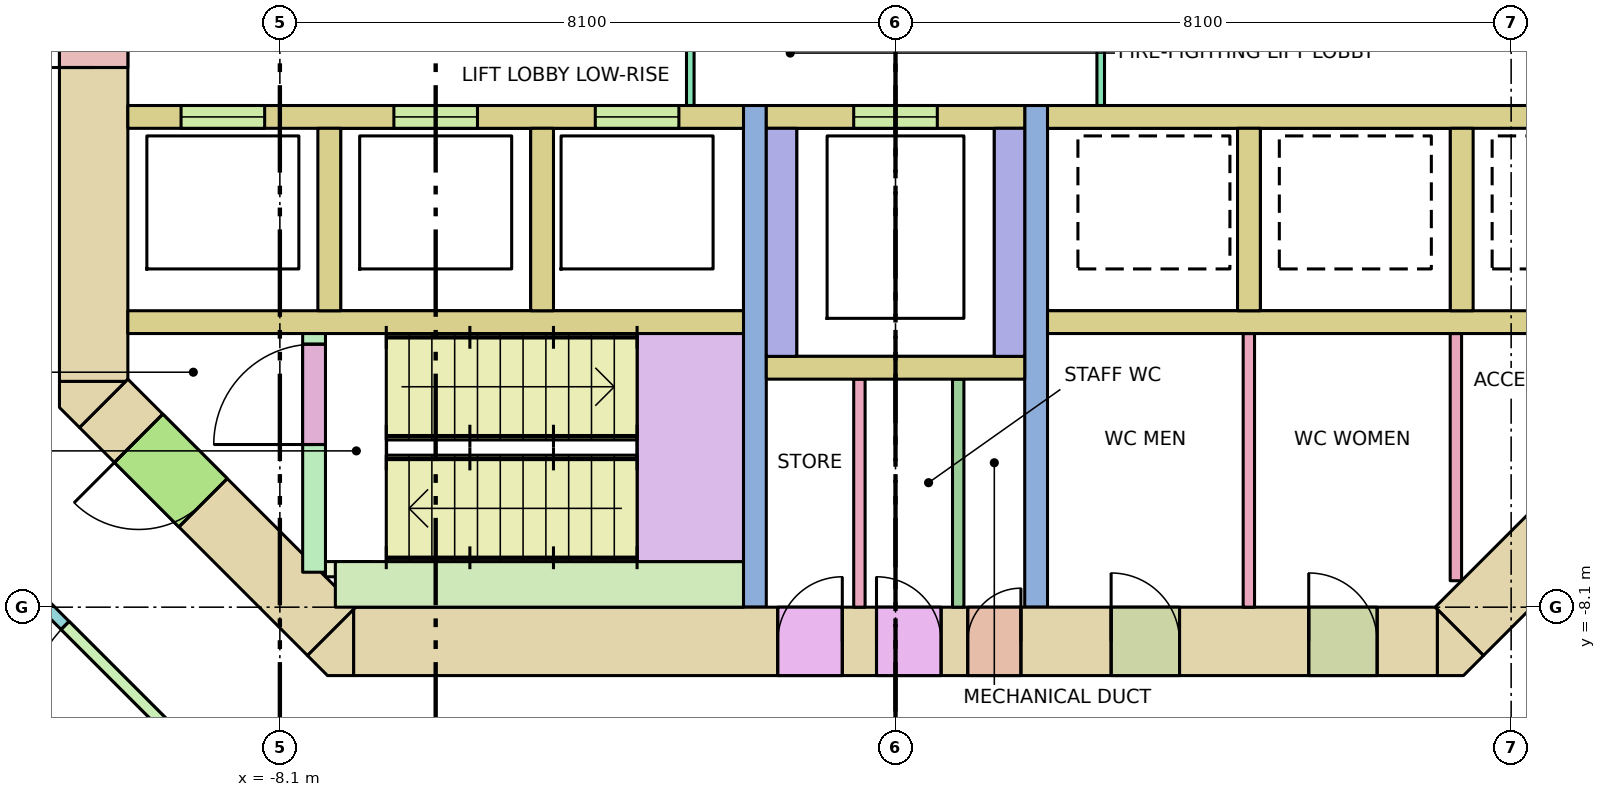
"""IFC4 building model, lengths in metres.
Left out: names, types, materials, properties, quantities, classifications, styles, units other than length and angle.
Written with IfcOpenShell. Run it as: python <this file> out.ifc"""

import sys

from ifc_helpers import new_model, si_unit, direction, frame, frame_2d, origin, place, context, subcontext, project, spatial, polyline, rectangle, outline, extrude, element, fill, save


model = new_model("IFC4")
c1 = context("Model", 3, precision=1e-05, world=origin(), true_north=direction((0.0, 1.0)))
c2 = subcontext(c1, "Body", "Model", "MODEL_VIEW")
j1 = project(units=[si_unit("LENGTHUNIT", "METRE"), si_unit("PLANEANGLEUNIT", "RADIAN")], contexts=[c1])
p1 = place(None, origin())
s1 = spatial("IfcSite", under=j1, at=p1, CompositionType="ELEMENT")
p2 = place(p1, origin())
s2 = spatial("IfcBuilding", under=s1, at=p2, CompositionType="ELEMENT")
p3 = place(p2, frame((0.0, 0.0, 71.0)))
s3 = spatial("IfcBuildingStorey", under=s2, at=p3, CompositionType="ELEMENT", Elevation=71.0)
p4 = place(p3, frame((-7.13, -8.55, -0.28), z_axis=(0.0, 0.0, 1.0), x_axis=(1.0, 0.0, 0.0)))
e1 = element("IfcWall", 1, at=p4, inside=s3, PredefinedType="SHEAR", context=c2, shape_type="SweptSolid", body=[
    extrude(rectangle(XDim=14.26, YDim=0.9, at=frame_2d((7.13, 0.0))), origin(), (0.0, 0.0, 1.0), 4.0),
])
p5 = place(p4, frame((8.08, 0.0, 0.28)))
e2 = element("IfcOpeningElement", 2, at=p5, cuts=e1, PredefinedType="OPENING", context=c2, shape_type="SweptSolid", body=[
    extrude(rectangle(XDim=0.7, YDim=2.1, at=frame_2d((0.35, 1.05))), frame((0.0, 0.46, 0.0), z_axis=(0.0, -1.0, 0.0), x_axis=(1.0, 0.0, 0.0)), (0.0, 0.0, 1.0), 0.92),
])
p6 = place(p4, frame((5.58, 0.0, 0.28)))
e3 = element("IfcOpeningElement", 3, at=p6, cuts=e1, PredefinedType="OPENING", context=c2, shape_type="SweptSolid", body=[
    extrude(rectangle(XDim=0.85, YDim=2.1, at=frame_2d((0.425, 1.05))), frame((0.0, 0.46, 0.0), z_axis=(0.0, -1.0, 0.0), x_axis=(1.0, 0.0, 0.0)), (0.0, 0.0, 1.0), 0.92),
])
p7 = place(p4, frame((6.88, 0.0, 0.28)))
e4 = element("IfcOpeningElement", 4, at=p7, cuts=e1, PredefinedType="OPENING", context=c2, shape_type="SweptSolid", body=[
    extrude(rectangle(XDim=0.85, YDim=2.1, at=frame_2d((0.425, 1.05))), frame((0.0, 0.46, 0.0), z_axis=(0.0, -1.0, 0.0), x_axis=(1.0, 0.0, 0.0)), (0.0, 0.0, 1.0), 0.92),
])
p8 = place(p4, frame((9.967, 0.0, 0.28)))
e5 = element("IfcOpeningElement", 5, at=p8, cuts=e1, PredefinedType="OPENING", context=c2, shape_type="SweptSolid", body=[
    extrude(rectangle(XDim=0.9, YDim=2.1, at=frame_2d((0.45, 1.05))), frame((0.0, 0.46, 0.0), z_axis=(0.0, -1.0, 0.0), x_axis=(1.0, 0.0, 0.0)), (0.0, 0.0, 1.0), 0.92),
])
p9 = place(p4, frame((12.567, 0.0, 0.28)))
e6 = element("IfcOpeningElement", 6, at=p9, cuts=e1, PredefinedType="OPENING", context=c2, shape_type="SweptSolid", body=[
    extrude(rectangle(XDim=0.9, YDim=2.1, at=frame_2d((0.45, 1.05))), frame((0.0, 0.46, 0.0), z_axis=(0.0, -1.0, 0.0), x_axis=(1.0, 0.0, 0.0)), (0.0, 0.0, 1.0), 0.92),
])
p10 = place(p3, frame((-10.55, -5.13, -0.28), z_axis=(0.0, 0.0, 1.0), x_axis=(0.0, 1.0, 0.0)))
e7 = element("IfcWall", 7, at=p10, inside=s3, PredefinedType="SHEAR", context=c2, shape_type="SweptSolid", body=[
    extrude(rectangle(XDim=10.26, YDim=0.9, at=frame_2d((5.13, 0.0))), origin(), (0.0, 0.0, 1.0), 4.0),
])
p11 = place(p10, frame((4.13, 0.0, 0.28)))
e8 = element("IfcOpeningElement", 8, at=p11, cuts=e7, PredefinedType="OPENING", context=c2, shape_type="SweptSolid", body=[
    extrude(rectangle(XDim=2.0, YDim=2.1, at=frame_2d((1.0, 1.05))), frame((0.0, 0.46, 0.0), z_axis=(0.0, -1.0, 0.0), x_axis=(1.0, 0.0, 0.0)), (0.0, 0.0, 1.0), 0.92),
])
p12 = place(p3, frame((10.418, -5.418, -0.28), z_axis=(0.0, 0.0, 1.0), x_axis=(-0.707106781187, -0.707106781187, 0.0)))
e9 = element("IfcWall", 9, at=p12, inside=s3, PredefinedType="SHEAR", context=c2, shape_type="SweptSolid", body=[
    extrude(rectangle(XDim=4.243, YDim=0.9, at=frame_2d((2.121, 0.0))), origin(), (0.0, 0.0, 1.0), 4.0),
])
p13 = place(p12, frame((0.52, 0.0, 0.28)))
e10 = element("IfcOpeningElement", 10, at=p13, cuts=e9, PredefinedType="OPENING", context=c2, shape_type="SweptSolid", body=[
    extrude(rectangle(XDim=0.9, YDim=2.1, at=frame_2d((0.45, 1.05))), frame((0.0, 0.46, 0.0), z_axis=(0.0, -1.0, 0.0), x_axis=(1.0, 0.0, 0.0)), (0.0, 0.0, 1.0), 0.92),
])
p14 = place(p3, frame((-7.418, -8.418, -0.28), z_axis=(0.0, 0.0, 1.0), x_axis=(-0.707106781187, 0.707106781187, 0.0)))
e11 = element("IfcWall", 11, at=p14, inside=s3, PredefinedType="SHEAR", context=c2, shape_type="SweptSolid", body=[
    extrude(rectangle(XDim=4.243, YDim=0.9, at=frame_2d((2.121, 0.0))), origin(), (0.0, 0.0, 1.0), 4.0),
])
p15 = place(p14, frame((2.393, 0.0, 0.28)))
e12 = element("IfcOpeningElement", 12, at=p15, cuts=e11, PredefinedType="OPENING", context=c2, shape_type="SweptSolid", body=[
    extrude(rectangle(XDim=1.2, YDim=2.1, at=frame_2d((0.6, 1.05))), frame((0.0, 0.46, 0.0), z_axis=(0.0, -1.0, 0.0), x_axis=(1.0, 0.0, 0.0)), (0.0, 0.0, 1.0), 0.92),
])
p16 = place(p3, frame((0.0, 0.0, -0.28)))
e13 = element("IfcWall", 13, at=p16, inside=s3, PredefinedType="SHEAR", context=c2, shape_type="SweptSolid", body=[
    extrude(outline(polyline([(-7.473, -9.0), (-7.736, -8.736), (-7.13, -8.13), (-7.13, -9.0), (-7.473, -9.0)])), origin(), (0.0, 0.0, 1.0), 4.0),
])
p17 = place(p3, frame((0.0, 0.0, -0.28)))
e14 = element("IfcWall", 14, at=p17, inside=s3, PredefinedType="SHEAR", context=c2, shape_type="SweptSolid", body=[
    extrude(outline(polyline([(7.473, -9.0), (7.13, -9.0), (7.13, -8.13), (7.736, -8.736), (7.473, -9.0)])), origin(), (0.0, 0.0, 1.0), 4.0),
])
p18 = place(p3, frame((0.0, 0.0, -0.28)))
e15 = element("IfcWall", 15, at=p18, inside=s3, PredefinedType="SHEAR", context=c2, shape_type="SweptSolid", body=[
    extrude(outline(polyline([(-11.0, -5.473), (-11.0, -5.13), (-10.13, -5.13), (-10.736, -5.736), (-11.0, -5.473)])), origin(), (0.0, 0.0, 1.0), 4.0),
])
for number, where, z_axis, x_axis in (
    (16, (-10.1, -4.35, 0.0), (0.0, 0.0, 1.0), (1.0, 0.0, 0.0)),
    (17, (2.0, -4.35, 0.0), (0.0, 0.0, 1.0), (1.0, 0.0, 0.0)),
):
    element("IfcWall", number, at=place(p3, frame(where, z_axis=z_axis, x_axis=x_axis)), inside=s3, PredefinedType="SOLIDWALL", context=c2, shape_type="SweptSolid", body=[
        extrude(rectangle(XDim=8.1, YDim=0.3, at=frame_2d((4.05, 0.0))), origin(), (0.0, 0.0, 1.0), 3.72),
    ])
p19 = place(p3, frame((-10.1, -1.65, 0.0), z_axis=(0.0, 0.0, 1.0), x_axis=(1.0, 0.0, 0.0)))
e18 = element("IfcWall", 18, at=p19, inside=s3, PredefinedType="SOLIDWALL", context=c2, shape_type="SweptSolid", body=[
    extrude(rectangle(XDim=8.1, YDim=0.3, at=frame_2d((4.05, 0.0))), origin(), (0.0, 0.0, 1.0), 3.72),
])
p20 = place(p19, frame((0.7, 0.0, 0.0)))
e19 = element("IfcOpeningElement", 19, at=p20, cuts=e18, PredefinedType="OPENING", context=c2, shape_type="SweptSolid", body=[
    extrude(rectangle(XDim=1.1, YDim=2.1, at=frame_2d((0.55, 1.05))), frame((0.0, 0.16, 0.0), z_axis=(0.0, -1.0, 0.0), x_axis=(1.0, 0.0, 0.0)), (0.0, 0.0, 1.0), 0.32),
])
p21 = place(p19, frame((3.5, 0.0, 0.0)))
e20 = element("IfcOpeningElement", 20, at=p21, cuts=e18, PredefinedType="OPENING", context=c2, shape_type="SweptSolid", body=[
    extrude(rectangle(XDim=1.1, YDim=2.1, at=frame_2d((0.55, 1.05))), frame((0.0, 0.16, 0.0), z_axis=(0.0, -1.0, 0.0), x_axis=(1.0, 0.0, 0.0)), (0.0, 0.0, 1.0), 0.32),
])
p22 = place(p19, frame((6.15, 0.0, 0.0)))
e21 = element("IfcOpeningElement", 21, at=p22, cuts=e18, PredefinedType="OPENING", context=c2, shape_type="SweptSolid", body=[
    extrude(rectangle(XDim=1.1, YDim=2.1, at=frame_2d((0.55, 1.05))), frame((0.0, 0.16, 0.0), z_axis=(0.0, -1.0, 0.0), x_axis=(1.0, 0.0, 0.0)), (0.0, 0.0, 1.0), 0.32),
])
p23 = place(p3, frame((2.0, -1.65, 0.0), z_axis=(0.0, 0.0, 1.0), x_axis=(1.0, 0.0, 0.0)))
e22 = element("IfcWall", 22, at=p23, inside=s3, PredefinedType="SOLIDWALL", context=c2, shape_type="SweptSolid", body=[
    extrude(rectangle(XDim=8.1, YDim=0.3, at=frame_2d((4.05, 0.0))), origin(), (0.0, 0.0, 1.0), 3.72),
])
for number, where, z_axis, x_axis in (
    (23, (-7.45, -4.2, 0.0), (0.0, 0.0, 1.0), (0.0, 1.0, 0.0)),
    (24, (-4.65, -4.2, 0.0), (0.0, 0.0, 1.0), (0.0, 1.0, 0.0)),
    (25, (4.65, -4.2, 0.0), (0.0, 0.0, 1.0), (0.0, 1.0, 0.0)),
    (26, (7.45, -4.2, 0.0), (0.0, 0.0, 1.0), (0.0, 1.0, 0.0)),
):
    element("IfcWall", number, at=place(p3, frame(where, z_axis=z_axis, x_axis=x_axis)), inside=s3, PredefinedType="SOLIDWALL", context=c2, shape_type="SweptSolid", body=[
        extrude(rectangle(XDim=2.4, YDim=0.3, at=frame_2d((1.2, 0.0))), origin(), (0.0, 0.0, 1.0), 3.72),
    ])
for number, where, z_axis, x_axis in (
    (27, (-1.85, -8.1, 0.0), (0.0, 0.0, 1.0), (0.0, 1.0, 0.0)),
    (28, (1.85, -8.1, 0.0), (0.0, 0.0, 1.0), (0.0, 1.0, 0.0)),
):
    element("IfcWall", number, at=place(p3, frame(where, z_axis=z_axis, x_axis=x_axis)), inside=s3, PredefinedType="SHEAR", context=c2, shape_type="SweptSolid", body=[
        extrude(rectangle(XDim=6.6, YDim=0.3, at=frame_2d((3.3, 0.0))), origin(), (0.0, 0.0, 1.0), 3.72),
    ])
p24 = place(p3, frame((-1.7, -1.65, 0.0), z_axis=(0.0, 0.0, 1.0), x_axis=(1.0, 0.0, 0.0)))
e29 = element("IfcWall", 29, at=p24, inside=s3, PredefinedType="SOLIDWALL", context=c2, shape_type="SweptSolid", body=[
    extrude(rectangle(XDim=3.4, YDim=0.3, at=frame_2d((1.7, 0.0))), origin(), (0.0, 0.0, 1.0), 3.72),
])
p25 = place(p24, frame((1.15, 0.0, 0.0)))
e30 = element("IfcOpeningElement", 30, at=p25, cuts=e29, PredefinedType="OPENING", context=c2, shape_type="SweptSolid", body=[
    extrude(rectangle(XDim=1.1, YDim=2.1, at=frame_2d((0.55, 1.05))), frame((0.0, 0.16, 0.0), z_axis=(0.0, -1.0, 0.0), x_axis=(1.0, 0.0, 0.0)), (0.0, 0.0, 1.0), 0.32),
])
for number, where, z_axis, x_axis in (
    (31, (-1.5, -4.8, 0.0), (0.0, 0.0, 1.0), (0.0, 1.0, 0.0)),
    (32, (1.5, -4.8, 0.0), (0.0, 0.0, 1.0), (0.0, 1.0, 0.0)),
):
    element("IfcWall", number, at=place(p3, frame(where, z_axis=z_axis, x_axis=x_axis)), inside=s3, PredefinedType="SOLIDWALL", context=c2, shape_type="SweptSolid", body=[
        extrude(rectangle(XDim=3.0, YDim=0.4, at=frame_2d((1.5, 0.0))), origin(), (0.0, 0.0, 1.0), 3.72),
    ])
p26 = place(p3, frame((-1.7, -4.95, 0.0), z_axis=(0.0, 0.0, 1.0), x_axis=(1.0, 0.0, 0.0)))
e33 = element("IfcWall", 33, at=p26, inside=s3, PredefinedType="SOLIDWALL", context=c2, shape_type="SweptSolid", body=[
    extrude(rectangle(XDim=3.4, YDim=0.3, at=frame_2d((1.7, 0.0))), origin(), (0.0, 0.0, 1.0), 3.72),
])
p27 = place(p3, frame((-7.65, -7.64, 0.0), z_axis=(0.0, 0.0, 1.0), x_axis=(0.0, 1.0, 0.0)))
e34 = element("IfcWall", 34, at=p27, inside=s3, PredefinedType="SHEAR", context=c2, shape_type="SweptSolid", body=[
    extrude(rectangle(XDim=3.14, YDim=0.3, at=frame_2d((1.57, 0.0))), origin(), (0.0, 0.0, 1.0), 3.72),
])
p28 = place(p27, frame((1.68, 0.0, 0.0)))
e35 = element("IfcOpeningElement", 35, at=p28, cuts=e34, PredefinedType="OPENING", context=c2, shape_type="SweptSolid", body=[
    extrude(rectangle(XDim=1.32, YDim=2.1, at=frame_2d((0.66, 1.05))), frame((0.0, 0.16, 0.0), z_axis=(0.0, -1.0, 0.0), x_axis=(1.0, 0.0, 0.0)), (0.0, 0.0, 1.0), 0.32),
])
p29 = place(p3, frame((-7.5, -7.6, 0.0), z_axis=(0.0, 0.0, 1.0), x_axis=(1.0, 0.0, 0.0)))
e36 = element("IfcWall", 36, at=p29, inside=s3, PredefinedType="SHEAR", context=c2, shape_type="SweptSolid", body=[
    extrude(rectangle(XDim=0.6, YDim=0.2, at=frame_2d((0.3, 0.0))), origin(), (0.0, 0.0, 1.0), 3.72),
])
p30 = place(p3, frame((-7.37, -7.8, 0.0), z_axis=(0.0, 0.0, 1.0), x_axis=(1.0, 0.0, 0.0)))
e37 = element("IfcWall", 37, at=p30, inside=s3, PredefinedType="SHEAR", context=c2, shape_type="SweptSolid", body=[
    extrude(rectangle(XDim=5.37, YDim=0.6, at=frame_2d((2.685, 0.0))), origin(), (0.0, 0.0, 1.0), 3.72),
])
p31 = place(p3, frame((-2.7, -1.5, 0.0), z_axis=(0.0, 0.0, 1.0), x_axis=(0.0, 1.0, 0.0)))
e38 = element("IfcWall", 38, at=p31, inside=s3, PredefinedType="PARTITIONING", context=c2, shape_type="SweptSolid", body=[
    extrude(rectangle(XDim=3.0, YDim=0.1, at=frame_2d((1.5, 0.0))), origin(), (0.0, 0.0, 1.0), 3.72),
])
p32 = place(p31, frame((0.9, 0.0, 0.0)))
e39 = element("IfcOpeningElement", 39, at=p32, cuts=e38, PredefinedType="OPENING", context=c2, shape_type="SweptSolid", body=[
    extrude(rectangle(XDim=1.2, YDim=2.1, at=frame_2d((0.6, 1.05))), frame((0.0, 0.06, 0.0), z_axis=(0.0, -1.0, 0.0), x_axis=(1.0, 0.0, 0.0)), (0.0, 0.0, 1.0), 0.12),
])
p33 = place(p3, frame((2.7, -1.5, 0.0), z_axis=(0.0, 0.0, 1.0), x_axis=(0.0, 1.0, 0.0)))
e40 = element("IfcWall", 40, at=p33, inside=s3, PredefinedType="PARTITIONING", context=c2, shape_type="SweptSolid", body=[
    extrude(rectangle(XDim=3.0, YDim=0.1, at=frame_2d((1.5, 0.0))), origin(), (0.0, 0.0, 1.0), 3.72),
])
p34 = place(p33, frame((0.9, 0.0, 0.0)))
e41 = element("IfcOpeningElement", 41, at=p34, cuts=e40, PredefinedType="OPENING", context=c2, shape_type="SweptSolid", body=[
    extrude(rectangle(XDim=1.2, YDim=2.1, at=frame_2d((0.6, 1.05))), frame((0.0, 0.06, 0.0), z_axis=(0.0, -1.0, 0.0), x_axis=(1.0, 0.0, 0.0)), (0.0, 0.0, 1.0), 0.12),
])
for number, where, z_axis, x_axis in (
    (42, (0.825, -8.1, 0.0), (0.0, 0.0, 1.0), (0.0, 1.0, 0.0)),
    (43, (-0.475, -8.1, 0.0), (0.0, 0.0, 1.0), (0.0, 1.0, 0.0)),
):
    element("IfcWall", number, at=place(p3, frame(where, z_axis=z_axis, x_axis=x_axis)), inside=s3, PredefinedType="PARTITIONING", context=c2, shape_type="SweptSolid", body=[
        extrude(rectangle(XDim=3.0, YDim=0.15, at=frame_2d((1.5, 0.0))), origin(), (0.0, 0.0, 1.0), 3.72),
    ])
p35 = place(p3, frame((4.649, -8.1, 0.0), z_axis=(0.0, 0.0, 1.0), x_axis=(0.0, 1.0, 0.0)))
e44 = element("IfcWall", 44, at=p35, inside=s3, PredefinedType="PARTITIONING", context=c2, shape_type="SweptSolid", body=[
    extrude(rectangle(XDim=3.6, YDim=0.15, at=frame_2d((1.8, 0.0))), origin(), (0.0, 0.0, 1.0), 3.72),
])
p36 = place(p3, frame((7.373, -7.752, 0.0), z_axis=(0.0, 0.0, 1.0), x_axis=(0.0, 1.0, 0.0)))
e45 = element("IfcWall", 45, at=p36, inside=s3, PredefinedType="PARTITIONING", context=c2, shape_type="SweptSolid", body=[
    extrude(rectangle(XDim=3.252, YDim=0.15, at=frame_2d((1.626, 0.0))), origin(), (0.0, 0.0, 1.0), 3.72),
])
p37 = place(p3, frame((-8.328, -10.938, 0.0), z_axis=(0.0, 0.0, 1.0), x_axis=(-0.707125355289, 0.707088206597, 0.0)))
e46 = element("IfcWall", 46, at=p37, inside=s3, PredefinedType="PARTITIONING", context=c2, shape_type="SweptSolid", body=[
    extrude(rectangle(XDim=6.572, YDim=0.15, at=frame_2d((3.286, 0.0))), origin(), (0.0, 0.0, 1.0), 2.82),
])
p38 = place(p37, frame((1.874, 0.0, 0.0)))
e47 = element("IfcOpeningElement", 47, at=p38, cuts=e46, PredefinedType="OPENING", context=c2, shape_type="SweptSolid", body=[
    extrude(rectangle(XDim=1.8, YDim=2.1, at=frame_2d((0.9, 1.05))), frame((0.0, 0.085, 0.0), z_axis=(0.0, -1.0, 0.0), x_axis=(1.0, 0.0, 0.0)), (0.0, 0.0, 1.0), 0.17),
])
p39 = place(p3, frame((12.975, -6.291, 0.0), z_axis=(0.0, 0.0, 1.0), x_axis=(-0.707125355289, -0.707088206597, 0.0)))
e48 = element("IfcWall", 48, at=p39, inside=s3, PredefinedType="PARTITIONING", context=c2, shape_type="SweptSolid", body=[
    extrude(rectangle(XDim=6.572, YDim=0.15, at=frame_2d((3.286, 0.0))), origin(), (0.0, 0.0, 1.0), 2.82),
])
p40 = place(p39, frame((3.298, 0.0, 0.0)))
e49 = element("IfcOpeningElement", 49, at=p40, cuts=e48, PredefinedType="OPENING", context=c2, shape_type="SweptSolid", body=[
    extrude(rectangle(XDim=1.0, YDim=2.1, at=frame_2d((0.5, 1.05))), frame((0.0, 0.085, 0.0), z_axis=(0.0, -1.0, 0.0), x_axis=(1.0, 0.0, 0.0)), (0.0, 0.0, 1.0), 0.17),
])
p41 = place(p20, origin())
e50 = element("IfcDoor", 50, at=p41, inside=s3, OperationType="DOUBLE_DOOR_SLIDING", PredefinedType="DOOR", context=c2, shape_type="SweptSolid", body=[
    extrude(rectangle(XDim=1.1, YDim=2.1, at=frame_2d((0.55, 1.05))), frame((0.0, 0.025, 0.0), z_axis=(0.0, -1.0, 0.0), x_axis=(1.0, 0.0, 0.0)), (0.0, 0.0, 1.0), 0.05),
])
fill(e19, e50)
p42 = place(p21, origin())
e51 = element("IfcDoor", 51, at=p42, inside=s3, OperationType="DOUBLE_DOOR_SLIDING", PredefinedType="DOOR", context=c2, shape_type="SweptSolid", body=[
    extrude(rectangle(XDim=1.1, YDim=2.1, at=frame_2d((0.55, 1.05))), frame((0.0, 0.025, 0.0), z_axis=(0.0, -1.0, 0.0), x_axis=(1.0, 0.0, 0.0)), (0.0, 0.0, 1.0), 0.05),
])
fill(e20, e51)
p43 = place(p22, origin())
e52 = element("IfcDoor", 52, at=p43, inside=s3, OperationType="DOUBLE_DOOR_SLIDING", PredefinedType="DOOR", context=c2, shape_type="SweptSolid", body=[
    extrude(rectangle(XDim=1.1, YDim=2.1, at=frame_2d((0.55, 1.05))), frame((0.0, 0.025, 0.0), z_axis=(0.0, -1.0, 0.0), x_axis=(1.0, 0.0, 0.0)), (0.0, 0.0, 1.0), 0.05),
])
fill(e21, e52)
p44 = place(p25, origin())
e53 = element("IfcDoor", 53, at=p44, inside=s3, OperationType="DOUBLE_DOOR_SLIDING", PredefinedType="DOOR", context=c2, shape_type="SweptSolid", body=[
    extrude(rectangle(XDim=1.1, YDim=2.1, at=frame_2d((0.55, 1.05))), frame((0.0, 0.025, 0.0), z_axis=(0.0, -1.0, 0.0), x_axis=(1.0, 0.0, 0.0)), (0.0, 0.0, 1.0), 0.05),
])
fill(e30, e53)
p45 = place(p28, origin())
e54 = element("IfcDoor", 54, at=p45, inside=s3, OperationType="DOUBLE_DOOR_SINGLE_SWING", PredefinedType="DOOR", context=c2, shape_type="SweptSolid", body=[
    extrude(rectangle(XDim=1.32, YDim=2.1, at=frame_2d((0.66, 1.05))), frame((0.0, 0.025, 0.0), z_axis=(0.0, -1.0, 0.0), x_axis=(1.0, 0.0, 0.0)), (0.0, 0.0, 1.0), 0.05),
])
fill(e35, e54)
p46 = place(p15, origin())
e55 = element("IfcDoor", 55, at=p46, inside=s3, OperationType="SINGLE_SWING_RIGHT", PredefinedType="DOOR", context=c2, shape_type="SweptSolid", body=[
    extrude(rectangle(XDim=1.2, YDim=2.1, at=frame_2d((0.6, 1.05))), frame((0.0, 0.025, 0.0), z_axis=(0.0, -1.0, 0.0), x_axis=(1.0, 0.0, 0.0)), (0.0, 0.0, 1.0), 0.05),
])
fill(e12, e55)
p47 = place(p11, origin())
e56 = element("IfcDoor", 56, at=p47, inside=s3, OperationType="DOUBLE_DOOR_SINGLE_SWING", PredefinedType="DOOR", context=c2, shape_type="SweptSolid", body=[
    extrude(rectangle(XDim=2.0, YDim=2.1, at=frame_2d((1.0, 1.05))), frame((0.0, 0.025, 0.0), z_axis=(0.0, -1.0, 0.0), x_axis=(1.0, 0.0, 0.0)), (0.0, 0.0, 1.0), 0.05),
])
fill(e8, e56)
p48 = place(p5, origin())
e57 = element("IfcDoor", 57, at=p48, inside=s3, OperationType="SINGLE_SWING_RIGHT", PredefinedType="DOOR", context=c2, shape_type="SweptSolid", body=[
    extrude(rectangle(XDim=0.7, YDim=2.1, at=frame_2d((0.35, 1.05))), frame((0.0, 0.025, 0.0), z_axis=(0.0, -1.0, 0.0), x_axis=(1.0, 0.0, 0.0)), (0.0, 0.0, 1.0), 0.05),
])
fill(e2, e57)
p49 = place(p6, origin())
e58 = element("IfcDoor", 58, at=p49, inside=s3, OperationType="SINGLE_SWING_RIGHT", PredefinedType="DOOR", context=c2, shape_type="SweptSolid", body=[
    extrude(rectangle(XDim=0.85, YDim=2.1, at=frame_2d((0.425, 1.05))), frame((0.0, 0.025, 0.0), z_axis=(0.0, -1.0, 0.0), x_axis=(1.0, 0.0, 0.0)), (0.0, 0.0, 1.0), 0.05),
])
fill(e3, e58)
p50 = place(p7, origin())
e59 = element("IfcDoor", 59, at=p50, inside=s3, OperationType="SINGLE_SWING_LEFT", PredefinedType="DOOR", context=c2, shape_type="SweptSolid", body=[
    extrude(rectangle(XDim=0.85, YDim=2.1, at=frame_2d((0.425, 1.05))), frame((0.0, 0.025, 0.0), z_axis=(0.0, -1.0, 0.0), x_axis=(1.0, 0.0, 0.0)), (0.0, 0.0, 1.0), 0.05),
])
fill(e4, e59)
p51 = place(p8, origin())
e60 = element("IfcDoor", 60, at=p51, inside=s3, OperationType="SINGLE_SWING_LEFT", PredefinedType="DOOR", context=c2, shape_type="SweptSolid", body=[
    extrude(rectangle(XDim=0.9, YDim=2.1, at=frame_2d((0.45, 1.05))), frame((0.0, 0.025, 0.0), z_axis=(0.0, -1.0, 0.0), x_axis=(1.0, 0.0, 0.0)), (0.0, 0.0, 1.0), 0.05),
])
fill(e5, e60)
p52 = place(p9, origin())
e61 = element("IfcDoor", 61, at=p52, inside=s3, OperationType="SINGLE_SWING_LEFT", PredefinedType="DOOR", context=c2, shape_type="SweptSolid", body=[
    extrude(rectangle(XDim=0.9, YDim=2.1, at=frame_2d((0.45, 1.05))), frame((0.0, 0.025, 0.0), z_axis=(0.0, -1.0, 0.0), x_axis=(1.0, 0.0, 0.0)), (0.0, 0.0, 1.0), 0.05),
])
fill(e6, e61)
p53 = place(p38, origin())
e62 = element("IfcDoor", 62, at=p53, inside=s3, OperationType="DOUBLE_DOOR_SINGLE_SWING", PredefinedType="DOOR", context=c2, shape_type="SweptSolid", body=[
    extrude(rectangle(XDim=1.8, YDim=2.1, at=frame_2d((0.9, 1.05))), frame((0.0, 0.025, 0.0), z_axis=(0.0, -1.0, 0.0), x_axis=(1.0, 0.0, 0.0)), (0.0, 0.0, 1.0), 0.05),
])
fill(e47, e62)
save(model, sys.argv[1])
